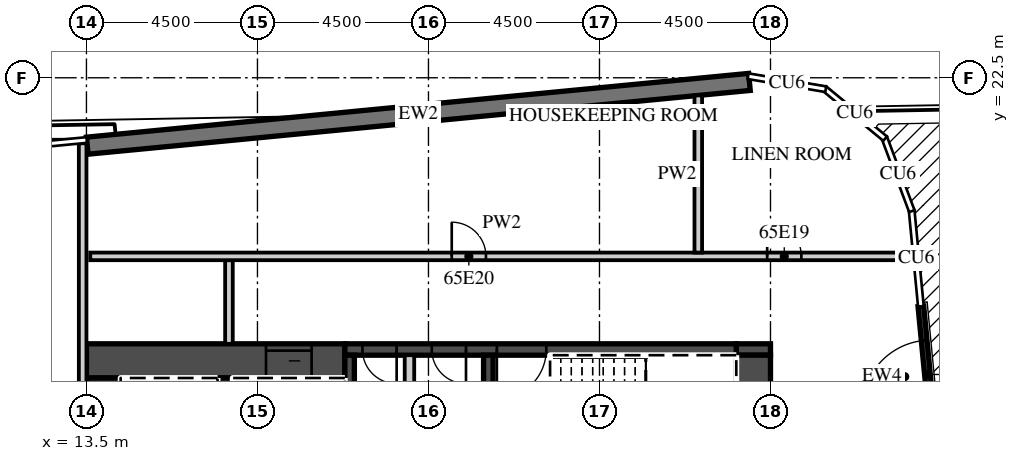
"""IFC4 building model, lengths in metres.
Left out: names, types, materials, properties, quantities, classifications, styles, units other than length and angle.
Written with IfcOpenShell. Run it as: python <this file> out.ifc"""

import sys

from ifc_helpers import new_model, si_unit, direction, frame, frame_2d, origin, place, context, subcontext, project, spatial, rectangle, extrude, element, fill, save


model = new_model("IFC4")
c1 = context("Model", 3, precision=1e-05, world=origin(), true_north=direction((0.0, 1.0)))
c2 = subcontext(c1, "Body", "Model", "MODEL_VIEW")
j1 = project(units=[si_unit("LENGTHUNIT", "METRE"), si_unit("PLANEANGLEUNIT", "RADIAN")], contexts=[c1])
p1 = place(None, origin())
s1 = spatial("IfcSite", under=j1, at=p1, CompositionType="ELEMENT")
p2 = place(p1, origin())
s2 = spatial("IfcBuilding", under=s1, at=p2, CompositionType="ELEMENT")
p3 = place(p2, frame((0.0, 0.0, 261.9)))
s3 = spatial("IfcBuildingStorey", under=s2, at=p3, CompositionType="ELEMENT", Elevation=261.9)
p4 = place(p3, frame((35.803, 12.901, 0.0), z_axis=(0.0, 0.0, 1.0), x_axis=(-0.095823535273, 0.995398337395, 0.0)))
e1 = element("IfcWall", 1, at=p4, inside=s3, PredefinedType="SOLIDWALL", context=c2, shape_type="SweptSolid", body=[
    extrude(rectangle(XDim=3.6, YDim=0.15, at=frame_2d((1.8, 0.0))), origin(), (0.0, 0.0, 1.0), 6.32),
])
p5 = place(p4, frame((0.9, 0.0, 0.0)))
e2 = element("IfcOpeningElement", 2, at=p5, cuts=e1, PredefinedType="OPENING", context=c2, shape_type="SweptSolid", body=[
    extrude(rectangle(XDim=1.8, YDim=2.4, at=frame_2d((0.9, 1.2))), frame((0.0, 0.085, 0.0), z_axis=(0.0, -1.0, 0.0), x_axis=(1.0, 0.0, 0.0)), (0.0, 0.0, 1.0), 0.17),
])
p6 = place(p3, frame((30.946, 22.391, 0.0), z_axis=(0.0, 0.0, 1.0), x_axis=(-0.995396397117, -0.095843688398, 0.0)))
e3 = element("IfcWall", 3, at=p6, inside=s3, PredefinedType="SOLIDWALL", context=c2, shape_type="SweptSolid", body=[
    extrude(rectangle(XDim=17.505, YDim=0.45, at=frame_2d((8.752, 0.0))), origin(), (0.0, 0.0, 1.0), 6.32),
])
p7 = place(p3, frame((13.5, 15.05, 0.0), z_axis=(0.0, 0.0, 1.0), x_axis=(1.0, 0.0, 0.0)))
e4 = element("IfcWall", 4, at=p7, inside=s3, PredefinedType="SHEAR", context=c2, shape_type="SweptSolid", body=[
    extrude(rectangle(XDim=6.8, YDim=0.9, at=frame_2d((3.4, 0.0))), origin(), (0.0, 0.0, 1.0), 6.32),
])
p8 = place(p7, frame((4.725, 0.0, 0.0)))
e5 = element("IfcOpeningElement", 5, at=p8, cuts=e4, PredefinedType="OPENING", context=c2, shape_type="SweptSolid", body=[
    extrude(rectangle(XDim=1.2, YDim=2.1, at=frame_2d((0.6, 1.05))), frame((0.0, 0.46, 0.0), z_axis=(0.0, -1.0, 0.0), x_axis=(1.0, 0.0, 0.0)), (0.0, 0.0, 1.0), 0.92),
])
p9 = place(p3, frame((30.6, 15.35, 0.0), z_axis=(0.0, 0.0, 1.0), x_axis=(1.0, 0.0, 0.0)))
e6 = element("IfcWall", 6, at=p9, inside=s3, PredefinedType="SHEAR", context=c2, shape_type="SweptSolid", body=[
    extrude(rectangle(XDim=0.9, YDim=0.3, at=frame_2d((0.45, 0.0))), origin(), (0.0, 0.0, 1.0), 6.32),
])
p10 = place(p3, frame((20.3, 15.35, 0.0), z_axis=(0.0, 0.0, 1.0), x_axis=(1.0, 0.0, 0.0)))
e7 = element("IfcWall", 7, at=p10, inside=s3, PredefinedType="SHEAR", context=c2, shape_type="SweptSolid", body=[
    extrude(rectangle(XDim=10.3, YDim=0.3, at=frame_2d((5.15, 0.0))), origin(), (0.0, 0.0, 1.0), 6.32),
])
p11 = place(p10, frame((4.0, 0.0, 0.0)))
e8 = element("IfcOpeningElement", 8, at=p11, cuts=e7, PredefinedType="OPENING", context=c2, shape_type="SweptSolid", body=[
    extrude(rectangle(XDim=1.3, YDim=2.1, at=frame_2d((0.65, 1.05))), frame((0.0, 0.16, 0.0), z_axis=(0.0, -1.0, 0.0), x_axis=(1.0, 0.0, 0.0)), (0.0, 0.0, 1.0), 0.32),
])
p12 = place(p10, frame((2.288, 0.0, 0.0)))
e9 = element("IfcOpeningElement", 9, at=p12, cuts=e7, PredefinedType="OPENING", context=c2, shape_type="SweptSolid", body=[
    extrude(rectangle(XDim=0.9, YDim=2.1, at=frame_2d((0.45, 1.05))), frame((0.0, 0.16, 0.0), z_axis=(0.0, -1.0, 0.0), x_axis=(1.0, 0.0, 0.0)), (0.0, 0.0, 1.0), 0.32),
])
p13 = place(p10, frame((0.462, 0.0, 0.0)))
e10 = element("IfcOpeningElement", 10, at=p13, cuts=e7, PredefinedType="OPENING", context=c2, shape_type="SweptSolid", body=[
    extrude(rectangle(XDim=0.9, YDim=2.1, at=frame_2d((0.45, 1.05))), frame((0.0, 0.16, 0.0), z_axis=(0.0, -1.0, 0.0), x_axis=(1.0, 0.0, 0.0)), (0.0, 0.0, 1.0), 0.32),
])
p14 = place(p3, frame((31.05, 2.4, 0.0), z_axis=(0.0, 0.0, 1.0), x_axis=(0.0, 1.0, 0.0)))
e11 = element("IfcWall", 11, at=p14, inside=s3, PredefinedType="SHEAR", context=c2, shape_type="SweptSolid", body=[
    extrude(rectangle(XDim=12.8, YDim=0.9, at=frame_2d((6.4, 0.0))), origin(), (0.0, 0.0, 1.0), 6.32),
])
p15 = place(p14, frame((0.2, 0.0, 0.0)))
e12 = element("IfcOpeningElement", 12, at=p15, cuts=e11, PredefinedType="OPENING", context=c2, shape_type="SweptSolid", body=[
    extrude(rectangle(XDim=1.1, YDim=2.1, at=frame_2d((0.55, 1.05))), frame((0.0, 0.46, 0.0), z_axis=(0.0, -1.0, 0.0), x_axis=(1.0, 0.0, 0.0)), (0.0, 0.0, 1.0), 0.92),
])
p16 = place(p3, frame((13.95, 2.4, 0.0), z_axis=(0.0, 0.0, 1.0), x_axis=(0.0, 1.0, 0.0)))
e13 = element("IfcWall", 13, at=p16, inside=s3, PredefinedType="SHEAR", context=c2, shape_type="SweptSolid", body=[
    extrude(rectangle(XDim=12.2, YDim=0.9, at=frame_2d((6.1, 0.0))), origin(), (0.0, 0.0, 1.0), 6.32),
])
p17 = place(p3, frame((17.15, 8.8, 0.0), z_axis=(0.0, 0.0, 1.0), x_axis=(0.0, 1.0, 0.0)))
e14 = element("IfcWall", 14, at=p17, inside=s3, PredefinedType="SHEAR", context=c2, shape_type="SweptSolid", body=[
    extrude(rectangle(XDim=5.8, YDim=0.4, at=frame_2d((2.9, 0.0))), origin(), (0.0, 0.0, 1.0), 6.32),
])
for number, where, z_axis, x_axis in (
    (15, (20.425, 11.95, 0.0), (0.0, 0.0, 1.0), (0.0, 1.0, 0.0)),
    (16, (24.075, 11.95, 0.0), (0.0, 0.0, 1.0), (0.0, 1.0, 0.0)),
):
    element("IfcWall", number, at=place(p3, frame(where, z_axis=z_axis, x_axis=x_axis)), inside=s3, PredefinedType="SHEAR", context=c2, shape_type="SweptSolid", body=[
        extrude(rectangle(XDim=3.25, YDim=0.25, at=frame_2d((1.625, 0.0))), origin(), (0.0, 0.0, 1.0), 6.32),
    ])
p18 = place(p3, frame((22.0, 11.95, 0.0), z_axis=(0.0, 0.0, 1.0), x_axis=(0.0, 1.0, 0.0)))
e17 = element("IfcWall", 17, at=p18, inside=s3, PredefinedType="PARTITIONING", context=c2, shape_type="SweptSolid", body=[
    extrude(rectangle(XDim=3.25, YDim=0.25, at=frame_2d((1.625, 0.0))), origin(), (0.0, 0.0, 1.0), 6.32),
])
p19 = place(p3, frame((17.25, 15.5, 0.0), z_axis=(0.0, 0.0, 1.0), x_axis=(0.0, 1.0, 0.0)))
e18 = element("IfcWall", 18, at=p19, inside=s3, PredefinedType="PARTITIONING", context=c2, shape_type="SweptSolid", body=[
    extrude(rectangle(XDim=2.2, YDim=0.2, at=frame_2d((1.1, 0.0))), origin(), (0.0, 0.0, 1.0), 6.32),
])
p20 = place(p3, frame((13.6, 17.8, 0.0), z_axis=(0.0, 0.0, 1.0), x_axis=(1.0, 0.0, 0.0)))
e19 = element("IfcWall", 19, at=p20, inside=s3, PredefinedType="PARTITIONING", context=c2, shape_type="SweptSolid", body=[
    extrude(rectangle(XDim=21.656, YDim=0.2, at=frame_2d((10.828, 0.0))), origin(), (0.0, 0.0, 1.0), 6.32),
])
p21 = place(p20, frame((17.812, 0.0, 0.0)))
e20 = element("IfcOpeningElement", 20, at=p21, cuts=e19, PredefinedType="OPENING", context=c2, shape_type="SweptSolid", body=[
    extrude(rectangle(XDim=0.9, YDim=2.1, at=frame_2d((0.45, 1.05))), frame((0.0, 0.11, 0.0), z_axis=(0.0, -1.0, 0.0), x_axis=(1.0, 0.0, 0.0)), (0.0, 0.0, 1.0), 0.22),
])
p22 = place(p20, frame((9.512, 0.0, 0.0)))
e21 = element("IfcOpeningElement", 21, at=p22, cuts=e19, PredefinedType="OPENING", context=c2, shape_type="SweptSolid", body=[
    extrude(rectangle(XDim=0.9, YDim=2.1, at=frame_2d((0.45, 1.05))), frame((0.0, 0.11, 0.0), z_axis=(0.0, -1.0, 0.0), x_axis=(1.0, 0.0, 0.0)), (0.0, 0.0, 1.0), 0.22),
])
p23 = place(p3, frame((29.6, 17.9, 0.0), z_axis=(0.0, 0.0, 1.0), x_axis=(0.0, 1.0, 0.0)))
e22 = element("IfcWall", 22, at=p23, inside=s3, PredefinedType="PARTITIONING", context=c2, shape_type="SweptSolid", body=[
    extrude(rectangle(XDim=4.136, YDim=0.2, at=frame_2d((2.068, 0.0))), origin(), (0.0, 0.0, 1.0), 6.32),
])
p24 = place(p3, frame((13.4, 1.7, 0.0), z_axis=(0.0, 0.0, 1.0), x_axis=(0.0, 1.0, 0.0)))
e23 = element("IfcWall", 23, at=p24, inside=s3, PredefinedType="PARTITIONING", context=c2, shape_type="SweptSolid", body=[
    extrude(rectangle(XDim=19.077, YDim=0.2, at=frame_2d((9.538, 0.0))), origin(), (0.0, 0.0, 1.0), 6.32),
])
p25 = place(p5, origin())
e24 = element("IfcDoor", 24, at=p25, inside=s3, OperationType="SINGLE_SWING_LEFT", PredefinedType="DOOR", context=c2, shape_type="SweptSolid", body=[
    extrude(rectangle(XDim=1.8, YDim=2.4, at=frame_2d((0.9, 1.2))), frame((0.0, 0.025, 0.0), z_axis=(0.0, -1.0, 0.0), x_axis=(1.0, 0.0, 0.0)), (0.0, 0.0, 1.0), 0.05),
])
fill(e2, e24)
p26 = place(p8, origin())
e25 = element("IfcDoor", 25, at=p26, inside=s3, OperationType="SLIDING_TO_LEFT", PredefinedType="DOOR", context=c2, shape_type="SweptSolid", body=[
    extrude(rectangle(XDim=1.2, YDim=2.1, at=frame_2d((0.6, 1.05))), frame((0.0, 0.025, 0.0), z_axis=(0.0, -1.0, 0.0), x_axis=(1.0, 0.0, 0.0)), (0.0, 0.0, 1.0), 0.05),
])
fill(e5, e25)
p27 = place(p11, origin())
e26 = element("IfcDoor", 26, at=p27, inside=s3, OperationType="SINGLE_SWING_LEFT", PredefinedType="DOOR", context=c2, shape_type="SweptSolid", body=[
    extrude(rectangle(XDim=1.3, YDim=2.1, at=frame_2d((0.65, 1.05))), frame((0.0, 0.025, 0.0), z_axis=(0.0, -1.0, 0.0), x_axis=(1.0, 0.0, 0.0)), (0.0, 0.0, 1.0), 0.05),
])
fill(e8, e26)
p28 = place(p12, origin())
e27 = element("IfcDoor", 27, at=p28, inside=s3, OperationType="SINGLE_SWING_RIGHT", PredefinedType="DOOR", context=c2, shape_type="SweptSolid", body=[
    extrude(rectangle(XDim=0.9, YDim=2.1, at=frame_2d((0.45, 1.05))), frame((0.0, 0.025, 0.0), z_axis=(0.0, -1.0, 0.0), x_axis=(1.0, 0.0, 0.0)), (0.0, 0.0, 1.0), 0.05),
])
fill(e9, e27)
p29 = place(p13, origin())
e28 = element("IfcDoor", 28, at=p29, inside=s3, OperationType="SINGLE_SWING_RIGHT", PredefinedType="DOOR", context=c2, shape_type="SweptSolid", body=[
    extrude(rectangle(XDim=0.9, YDim=2.1, at=frame_2d((0.45, 1.05))), frame((0.0, 0.025, 0.0), z_axis=(0.0, -1.0, 0.0), x_axis=(1.0, 0.0, 0.0)), (0.0, 0.0, 1.0), 0.05),
])
fill(e10, e28)
p30 = place(p21, origin())
e29 = element("IfcDoor", 29, at=p30, inside=s3, OperationType="SINGLE_SWING_LEFT", PredefinedType="DOOR", context=c2, shape_type="SweptSolid", body=[
    extrude(rectangle(XDim=0.9, YDim=2.1, at=frame_2d((0.45, 1.05))), frame((0.0, 0.025, 0.0), z_axis=(0.0, -1.0, 0.0), x_axis=(1.0, 0.0, 0.0)), (0.0, 0.0, 1.0), 0.05),
])
fill(e20, e29)
p31 = place(p22, origin())
e30 = element("IfcDoor", 30, at=p31, inside=s3, OperationType="SINGLE_SWING_LEFT", PredefinedType="DOOR", context=c2, shape_type="SweptSolid", body=[
    extrude(rectangle(XDim=0.9, YDim=2.1, at=frame_2d((0.45, 1.05))), frame((0.0, 0.025, 0.0), z_axis=(0.0, -1.0, 0.0), x_axis=(1.0, 0.0, 0.0)), (0.0, 0.0, 1.0), 0.05),
])
fill(e21, e30)
save(model, sys.argv[1])
